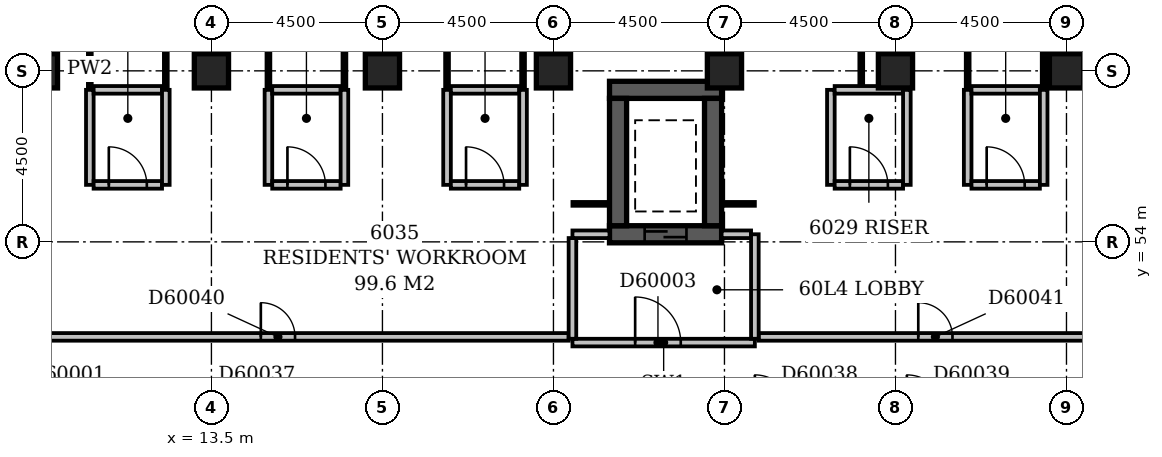
"""IFC4 building model, lengths in metres.
Left out: names, types, materials, properties, quantities, classifications, styles, units other than length and angle.
Written with IfcOpenShell. Run it as: python <this file> out.ifc"""

import sys

from ifc_helpers import new_model, si_unit, direction, frame, frame_2d, origin, origin_2d, place, context, subcontext, project, spatial, rectangle, extrude, element, fill, save


model = new_model("IFC4")
c1 = context("Model", 3, precision=1e-05, world=origin(), true_north=direction((0.0, 1.0)))
c2 = subcontext(c1, "Body", "Model", "MODEL_VIEW")
j1 = project(units=[si_unit("LENGTHUNIT", "METRE"), si_unit("PLANEANGLEUNIT", "RADIAN")], contexts=[c1])
p1 = place(None, origin())
s1 = spatial("IfcSite", under=j1, at=p1, CompositionType="ELEMENT")
p2 = place(p1, origin())
s2 = spatial("IfcBuilding", under=s1, at=p2, CompositionType="ELEMENT")
p3 = place(p2, frame((0.0, 0.0, 233.0)))
s3 = spatial("IfcBuildingStorey", under=s2, at=p3, CompositionType="ELEMENT", Elevation=233.0)
p4 = place(p3, frame((23.975, 54.2, -0.35), z_axis=(0.0, 0.0, 1.0), x_axis=(1.0, 0.0, 0.0)))
e1 = element("IfcWall", 1, at=p4, inside=s3, PredefinedType="SHEAR", context=c2, shape_type="SweptSolid", body=[
    extrude(rectangle(XDim=2.95, YDim=0.45, at=frame_2d((1.475, 0.0))), origin(), (0.0, 0.0, 1.0), 3.65),
])
p5 = place(p4, frame((0.925, 0.0, 0.35)))
e2 = element("IfcOpeningElement", 2, at=p5, cuts=e1, PredefinedType="OPENING", context=c2, shape_type="SweptSolid", body=[
    extrude(rectangle(XDim=1.1, YDim=2.1, at=frame_2d((0.55, 1.05))), frame((0.0, 0.237, 0.0), z_axis=(0.0, -1.0, 0.0), x_axis=(1.0, 0.0, 0.0)), (0.0, 0.0, 1.0), 0.474),
])
p6 = place(p3, frame((23.975, 58.0, -0.35), z_axis=(0.0, 0.0, 1.0), x_axis=(1.0, 0.0, 0.0)))
e3 = element("IfcWall", 3, at=p6, inside=s3, PredefinedType="SHEAR", context=c2, shape_type="SweptSolid", body=[
    extrude(rectangle(XDim=2.95, YDim=0.45, at=frame_2d((1.475, 0.0))), origin(), (0.0, 0.0, 1.0), 3.65),
])
for number, where, z_axis, x_axis in (
    (4, (24.2, 54.425, -0.35), (0.0, 0.0, 1.0), (0.0, 1.0, 0.0)),
    (5, (26.7, 54.425, -0.35), (0.0, 0.0, 1.0), (0.0, 1.0, 0.0)),
):
    element("IfcWall", number, at=place(p3, frame(where, z_axis=z_axis, x_axis=x_axis)), inside=s3, PredefinedType="SHEAR", context=c2, shape_type="SweptSolid", body=[
        extrude(rectangle(XDim=3.35, YDim=0.45, at=frame_2d((1.675, 0.0))), origin(), (0.0, 0.0, 1.0), 3.65),
    ])
for number, where, z_axis, x_axis in (
    (6, (9.0, 58.5, -0.35), (0.0, 0.0, 1.0), (1.0, 0.0, 0.0)),
    (7, (13.5, 58.5, -0.35), (0.0, 0.0, 1.0), (1.0, 0.0, 0.0)),
    (8, (18.0, 58.5, -0.35), (0.0, 0.0, 1.0), (1.0, 0.0, 0.0)),
    (9, (22.5, 58.5, -0.35), (0.0, 0.0, 1.0), (1.0, 0.0, 0.0)),
    (10, (27.0, 58.5, -0.35), (0.0, 0.0, 1.0), (1.0, 0.0, 0.0)),
    (11, (31.5, 58.5, -0.35), (0.0, 0.0, 1.0), (1.0, 0.0, 0.0)),
    (12, (36.0, 58.5, -0.35), (0.0, 0.0, 1.0), (1.0, 0.0, 0.0)),
):
    element("IfcColumn", number, at=place(p3, frame(where, z_axis=z_axis, x_axis=x_axis)), inside=s3, PredefinedType="COLUMN", context=c2, shape_type="SweptSolid", body=[
        extrude(rectangle(XDim=0.9, YDim=0.9, at=origin_2d()), origin(), (0.0, 0.0, 1.0), 3.65),
    ])
p7 = place(p3, frame((23.0, 51.35, 0.0), z_axis=(0.0, 0.0, 1.0), x_axis=(1.0, 0.0, 0.0)))
e13 = element("IfcWall", 13, at=p7, inside=s3, PredefinedType="PARTITIONING", context=c2, shape_type="SweptSolid", body=[
    extrude(rectangle(XDim=4.8, YDim=0.2, at=frame_2d((2.4, 0.0))), origin(), (0.0, 0.0, 1.0), 3.3),
])
p8 = place(p7, frame((1.65, 0.0, 0.0)))
e14 = element("IfcOpeningElement", 14, at=p8, cuts=e13, PredefinedType="OPENING", context=c2, shape_type="SweptSolid", body=[
    extrude(rectangle(XDim=1.2, YDim=2.1, at=frame_2d((0.6, 1.05))), frame((0.0, 0.112, 0.0), z_axis=(0.0, -1.0, 0.0), x_axis=(1.0, 0.0, 0.0)), (0.0, 0.0, 1.0), 0.224),
])
p9 = place(p3, frame((27.8, 51.45, 0.0), z_axis=(0.0, 0.0, 1.0), x_axis=(0.0, 1.0, 0.0)))
e15 = element("IfcWall", 15, at=p9, inside=s3, PredefinedType="PARTITIONING", context=c2, shape_type="SweptSolid", body=[
    extrude(rectangle(XDim=2.75, YDim=0.2, at=frame_2d((1.375, 0.0))), origin(), (0.0, 0.0, 1.0), 3.3),
])
p10 = place(p3, frame((23.0, 54.2, 0.0), z_axis=(0.0, 0.0, 1.0), x_axis=(1.0, 0.0, 0.0)))
e16 = element("IfcWall", 16, at=p10, inside=s3, PredefinedType="PARTITIONING", context=c2, shape_type="SweptSolid", body=[
    extrude(rectangle(XDim=0.975, YDim=0.2, at=frame_2d((0.488, 0.0))), origin(), (0.0, 0.0, 1.0), 3.3),
])
p11 = place(p3, frame((26.925, 54.2, 0.0), z_axis=(0.0, 0.0, 1.0), x_axis=(1.0, 0.0, 0.0)))
e17 = element("IfcWall", 17, at=p11, inside=s3, PredefinedType="PARTITIONING", context=c2, shape_type="SweptSolid", body=[
    extrude(rectangle(XDim=0.775, YDim=0.2, at=frame_2d((0.387, 0.0))), origin(), (0.0, 0.0, 1.0), 3.3),
])
p12 = place(p3, frame((23.0, 51.45, 0.0), z_axis=(0.0, 0.0, 1.0), x_axis=(0.0, 1.0, 0.0)))
e18 = element("IfcWall", 18, at=p12, inside=s3, PredefinedType="PARTITIONING", context=c2, shape_type="SweptSolid", body=[
    extrude(rectangle(XDim=2.65, YDim=0.2, at=frame_2d((1.325, 0.0))), origin(), (0.0, 0.0, 1.0), 3.3),
])
p13 = place(p3, frame((7.6, 51.5, 0.0), z_axis=(0.0, 0.0, 1.0), x_axis=(1.0, 0.0, 0.0)))
e19 = element("IfcWall", 19, at=p13, inside=s3, PredefinedType="PARTITIONING", context=c2, shape_type="SweptSolid", body=[
    extrude(rectangle(XDim=15.3, YDim=0.2, at=frame_2d((7.65, 0.0))), origin(), (0.0, 0.0, 1.0), 3.3),
])
p14 = place(p13, frame((7.2, 0.0, 0.0)))
e20 = element("IfcOpeningElement", 20, at=p14, cuts=e19, PredefinedType="OPENING", context=c2, shape_type="SweptSolid", body=[
    extrude(rectangle(XDim=0.9, YDim=2.1, at=frame_2d((0.45, 1.05))), frame((0.0, 0.112, 0.0), z_axis=(0.0, -1.0, 0.0), x_axis=(1.0, 0.0, 0.0)), (0.0, 0.0, 1.0), 0.224),
])
p15 = place(p3, frame((27.9, 51.5, 0.0), z_axis=(0.0, 0.0, 1.0), x_axis=(1.0, 0.0, 0.0)))
e21 = element("IfcWall", 21, at=p15, inside=s3, PredefinedType="PARTITIONING", context=c2, shape_type="SweptSolid", body=[
    extrude(rectangle(XDim=9.3, YDim=0.2, at=frame_2d((4.65, 0.0))), origin(), (0.0, 0.0, 1.0), 3.3),
])
p16 = place(p15, frame((4.2, 0.0, 0.0)))
e22 = element("IfcOpeningElement", 22, at=p16, cuts=e21, PredefinedType="OPENING", context=c2, shape_type="SweptSolid", body=[
    extrude(rectangle(XDim=0.9, YDim=2.1, at=frame_2d((0.45, 1.05))), frame((0.0, 0.112, 0.0), z_axis=(0.0, -1.0, 0.0), x_axis=(1.0, 0.0, 0.0)), (0.0, 0.0, 1.0), 0.224),
])
p17 = place(p3, frame((23.0, 55.0, 0.0), z_axis=(0.0, 0.0, 1.0), x_axis=(1.0, 0.0, 0.0)))
e23 = element("IfcWall", 23, at=p17, inside=s3, PredefinedType="PARTITIONING", context=c2, shape_type="SweptSolid", body=[
    extrude(rectangle(XDim=0.975, YDim=0.1, at=frame_2d((0.488, 0.0))), origin(), (0.0, 0.0, 1.0), 3.3),
])
p18 = place(p3, frame((26.925, 55.0, 0.0), z_axis=(0.0, 0.0, 1.0), x_axis=(1.0, 0.0, 0.0)))
e24 = element("IfcWall", 24, at=p18, inside=s3, PredefinedType="PARTITIONING", context=c2, shape_type="SweptSolid", body=[
    extrude(rectangle(XDim=0.875, YDim=0.1, at=frame_2d((0.438, 0.0))), origin(), (0.0, 0.0, 1.0), 3.3),
])
p19 = place(p3, frame((10.3, 55.5, 0.0), z_axis=(0.0, 0.0, 1.0), x_axis=(0.0, 1.0, 0.0)))
e25 = element("IfcWall", 25, at=p19, inside=s3, PredefinedType="PARTITIONING", context=c2, shape_type="SweptSolid", body=[
    extrude(rectangle(XDim=2.5, YDim=0.2, at=frame_2d((1.25, 0.0))), origin(), (0.0, 0.0, 1.0), 3.3),
])
p20 = place(p3, frame((10.4, 55.5, 0.0), z_axis=(0.0, 0.0, 1.0), x_axis=(1.0, 0.0, 0.0)))
e26 = element("IfcWall", 26, at=p20, inside=s3, PredefinedType="PARTITIONING", context=c2, shape_type="SweptSolid", body=[
    extrude(rectangle(XDim=1.8, YDim=0.2, at=frame_2d((0.9, 0.0))), origin(), (0.0, 0.0, 1.0), 3.3),
])
p21 = place(p20, frame((0.4, 0.0, 0.0)))
e27 = element("IfcOpeningElement", 27, at=p21, cuts=e26, PredefinedType="OPENING", context=c2, shape_type="SweptSolid", body=[
    extrude(rectangle(XDim=1.0, YDim=2.1, at=frame_2d((0.5, 1.05))), frame((0.0, 0.112, 0.0), z_axis=(0.0, -1.0, 0.0), x_axis=(1.0, 0.0, 0.0)), (0.0, 0.0, 1.0), 0.224),
])
for number, where, z_axis, x_axis in (
    (28, (12.3, 55.5, 0.0), (0.0, 0.0, 1.0), (0.0, 1.0, 0.0)),
    (29, (15.0, 55.5, 0.0), (0.0, 0.0, 1.0), (0.0, 1.0, 0.0)),
):
    element("IfcWall", number, at=place(p3, frame(where, z_axis=z_axis, x_axis=x_axis)), inside=s3, PredefinedType="PARTITIONING", context=c2, shape_type="SweptSolid", body=[
        extrude(rectangle(XDim=2.5, YDim=0.2, at=frame_2d((1.25, 0.0))), origin(), (0.0, 0.0, 1.0), 3.3),
    ])
p22 = place(p3, frame((15.1, 55.5, 0.0), z_axis=(0.0, 0.0, 1.0), x_axis=(1.0, 0.0, 0.0)))
e30 = element("IfcWall", 30, at=p22, inside=s3, PredefinedType="PARTITIONING", context=c2, shape_type="SweptSolid", body=[
    extrude(rectangle(XDim=1.8, YDim=0.2, at=frame_2d((0.9, 0.0))), origin(), (0.0, 0.0, 1.0), 3.3),
])
p23 = place(p22, frame((0.4, 0.0, 0.0)))
e31 = element("IfcOpeningElement", 31, at=p23, cuts=e30, PredefinedType="OPENING", context=c2, shape_type="SweptSolid", body=[
    extrude(rectangle(XDim=1.0, YDim=2.1, at=frame_2d((0.5, 1.05))), frame((0.0, 0.112, 0.0), z_axis=(0.0, -1.0, 0.0), x_axis=(1.0, 0.0, 0.0)), (0.0, 0.0, 1.0), 0.224),
])
for number, where, z_axis, x_axis in (
    (32, (17.0, 55.5, 0.0), (0.0, 0.0, 1.0), (0.0, 1.0, 0.0)),
    (33, (19.7, 55.5, 0.0), (0.0, 0.0, 1.0), (0.0, 1.0, 0.0)),
):
    element("IfcWall", number, at=place(p3, frame(where, z_axis=z_axis, x_axis=x_axis)), inside=s3, PredefinedType="PARTITIONING", context=c2, shape_type="SweptSolid", body=[
        extrude(rectangle(XDim=2.5, YDim=0.2, at=frame_2d((1.25, 0.0))), origin(), (0.0, 0.0, 1.0), 3.3),
    ])
p24 = place(p3, frame((19.8, 55.5, 0.0), z_axis=(0.0, 0.0, 1.0), x_axis=(1.0, 0.0, 0.0)))
e34 = element("IfcWall", 34, at=p24, inside=s3, PredefinedType="PARTITIONING", context=c2, shape_type="SweptSolid", body=[
    extrude(rectangle(XDim=1.8, YDim=0.2, at=frame_2d((0.9, 0.0))), origin(), (0.0, 0.0, 1.0), 3.3),
])
p25 = place(p24, frame((0.4, 0.0, 0.0)))
e35 = element("IfcOpeningElement", 35, at=p25, cuts=e34, PredefinedType="OPENING", context=c2, shape_type="SweptSolid", body=[
    extrude(rectangle(XDim=1.0, YDim=2.1, at=frame_2d((0.5, 1.05))), frame((0.0, 0.112, 0.0), z_axis=(0.0, -1.0, 0.0), x_axis=(1.0, 0.0, 0.0)), (0.0, 0.0, 1.0), 0.224),
])
for number, where, z_axis, x_axis in (
    (36, (21.7, 55.5, 0.0), (0.0, 0.0, 1.0), (0.0, 1.0, 0.0)),
    (37, (29.8, 55.5, 0.0), (0.0, 0.0, 1.0), (0.0, 1.0, 0.0)),
):
    element("IfcWall", number, at=place(p3, frame(where, z_axis=z_axis, x_axis=x_axis)), inside=s3, PredefinedType="PARTITIONING", context=c2, shape_type="SweptSolid", body=[
        extrude(rectangle(XDim=2.5, YDim=0.2, at=frame_2d((1.25, 0.0))), origin(), (0.0, 0.0, 1.0), 3.3),
    ])
p26 = place(p3, frame((29.9, 55.5, 0.0), z_axis=(0.0, 0.0, 1.0), x_axis=(1.0, 0.0, 0.0)))
e38 = element("IfcWall", 38, at=p26, inside=s3, PredefinedType="PARTITIONING", context=c2, shape_type="SweptSolid", body=[
    extrude(rectangle(XDim=1.8, YDim=0.2, at=frame_2d((0.9, 0.0))), origin(), (0.0, 0.0, 1.0), 3.3),
])
p27 = place(p26, frame((0.4, 0.0, 0.0)))
e39 = element("IfcOpeningElement", 39, at=p27, cuts=e38, PredefinedType="OPENING", context=c2, shape_type="SweptSolid", body=[
    extrude(rectangle(XDim=1.0, YDim=2.1, at=frame_2d((0.5, 1.05))), frame((0.0, 0.112, 0.0), z_axis=(0.0, -1.0, 0.0), x_axis=(1.0, 0.0, 0.0)), (0.0, 0.0, 1.0), 0.224),
])
for number, where, z_axis, x_axis in (
    (40, (31.8, 55.5, 0.0), (0.0, 0.0, 1.0), (0.0, 1.0, 0.0)),
    (41, (33.4, 55.5, 0.0), (0.0, 0.0, 1.0), (0.0, 1.0, 0.0)),
):
    element("IfcWall", number, at=place(p3, frame(where, z_axis=z_axis, x_axis=x_axis)), inside=s3, PredefinedType="PARTITIONING", context=c2, shape_type="SweptSolid", body=[
        extrude(rectangle(XDim=2.5, YDim=0.2, at=frame_2d((1.25, 0.0))), origin(), (0.0, 0.0, 1.0), 3.3),
    ])
p28 = place(p3, frame((33.5, 55.5, 0.0), z_axis=(0.0, 0.0, 1.0), x_axis=(1.0, 0.0, 0.0)))
e42 = element("IfcWall", 42, at=p28, inside=s3, PredefinedType="PARTITIONING", context=c2, shape_type="SweptSolid", body=[
    extrude(rectangle(XDim=1.8, YDim=0.2, at=frame_2d((0.9, 0.0))), origin(), (0.0, 0.0, 1.0), 3.3),
])
p29 = place(p28, frame((0.4, 0.0, 0.0)))
e43 = element("IfcOpeningElement", 43, at=p29, cuts=e42, PredefinedType="OPENING", context=c2, shape_type="SweptSolid", body=[
    extrude(rectangle(XDim=1.0, YDim=2.1, at=frame_2d((0.5, 1.05))), frame((0.0, 0.112, 0.0), z_axis=(0.0, -1.0, 0.0), x_axis=(1.0, 0.0, 0.0)), (0.0, 0.0, 1.0), 0.224),
])
p30 = place(p3, frame((35.4, 55.5, 0.0), z_axis=(0.0, 0.0, 1.0), x_axis=(0.0, 1.0, 0.0)))
e44 = element("IfcWall", 44, at=p30, inside=s3, PredefinedType="PARTITIONING", context=c2, shape_type="SweptSolid", body=[
    extrude(rectangle(XDim=2.5, YDim=0.2, at=frame_2d((1.25, 0.0))), origin(), (0.0, 0.0, 1.0), 2.4),
])
p31 = place(p3, frame((10.3, 58.0, 0.0), z_axis=(0.0, 0.0, 1.0), x_axis=(0.0, 1.0, 0.0)))
e45 = element("IfcWall", 45, at=p31, inside=s3, PredefinedType="PARTITIONING", context=c2, shape_type="SweptSolid", body=[
    extrude(rectangle(XDim=1.1, YDim=0.1, at=frame_2d((0.55, 0.0))), origin(), (0.0, 0.0, 1.0), 3.3),
])
p32 = place(p3, frame((10.4, 58.0, 0.0), z_axis=(0.0, 0.0, 1.0), x_axis=(1.0, 0.0, 0.0)))
e46 = element("IfcWall", 46, at=p32, inside=s3, PredefinedType="PARTITIONING", context=c2, shape_type="SweptSolid", body=[
    extrude(rectangle(XDim=1.8, YDim=0.2, at=frame_2d((0.9, 0.0))), origin(), (0.0, 0.0, 1.0), 3.3),
])
for number, where, z_axis, x_axis in (
    (47, (12.3, 58.0, 0.0), (0.0, 0.0, 1.0), (0.0, 1.0, 0.0)),
    (48, (15.0, 58.0, 0.0), (0.0, 0.0, 1.0), (0.0, 1.0, 0.0)),
):
    element("IfcWall", number, at=place(p3, frame(where, z_axis=z_axis, x_axis=x_axis)), inside=s3, PredefinedType="PARTITIONING", context=c2, shape_type="SweptSolid", body=[
        extrude(rectangle(XDim=1.1, YDim=0.1, at=frame_2d((0.55, 0.0))), origin(), (0.0, 0.0, 1.0), 3.3),
    ])
p33 = place(p3, frame((15.1, 58.0, 0.0), z_axis=(0.0, 0.0, 1.0), x_axis=(1.0, 0.0, 0.0)))
e49 = element("IfcWall", 49, at=p33, inside=s3, PredefinedType="PARTITIONING", context=c2, shape_type="SweptSolid", body=[
    extrude(rectangle(XDim=1.8, YDim=0.2, at=frame_2d((0.9, 0.0))), origin(), (0.0, 0.0, 1.0), 3.3),
])
for number, where, z_axis, x_axis in (
    (50, (17.0, 58.0, 0.0), (0.0, 0.0, 1.0), (0.0, 1.0, 0.0)),
    (51, (19.7, 58.0, 0.0), (0.0, 0.0, 1.0), (0.0, 1.0, 0.0)),
):
    element("IfcWall", number, at=place(p3, frame(where, z_axis=z_axis, x_axis=x_axis)), inside=s3, PredefinedType="PARTITIONING", context=c2, shape_type="SweptSolid", body=[
        extrude(rectangle(XDim=1.1, YDim=0.1, at=frame_2d((0.55, 0.0))), origin(), (0.0, 0.0, 1.0), 3.3),
    ])
p34 = place(p3, frame((19.8, 58.0, 0.0), z_axis=(0.0, 0.0, 1.0), x_axis=(1.0, 0.0, 0.0)))
e52 = element("IfcWall", 52, at=p34, inside=s3, PredefinedType="PARTITIONING", context=c2, shape_type="SweptSolid", body=[
    extrude(rectangle(XDim=1.8, YDim=0.2, at=frame_2d((0.9, 0.0))), origin(), (0.0, 0.0, 1.0), 3.3),
])
p35 = place(p3, frame((21.7, 58.0, 0.0), z_axis=(0.0, 0.0, 1.0), x_axis=(0.0, 1.0, 0.0)))
e53 = element("IfcWall", 53, at=p35, inside=s3, PredefinedType="PARTITIONING", context=c2, shape_type="SweptSolid", body=[
    extrude(rectangle(XDim=1.1, YDim=0.1, at=frame_2d((0.55, 0.0))), origin(), (0.0, 0.0, 1.0), 3.3),
])
p36 = place(p3, frame((29.9, 58.0, 0.0), z_axis=(0.0, 0.0, 1.0), x_axis=(1.0, 0.0, 0.0)))
e54 = element("IfcWall", 54, at=p36, inside=s3, PredefinedType="PARTITIONING", context=c2, shape_type="SweptSolid", body=[
    extrude(rectangle(XDim=1.8, YDim=0.2, at=frame_2d((0.9, 0.0))), origin(), (0.0, 0.0, 1.0), 3.3),
])
p37 = place(p3, frame((33.4, 58.0, 0.0), z_axis=(0.0, 0.0, 1.0), x_axis=(0.0, 1.0, 0.0)))
e55 = element("IfcWall", 55, at=p37, inside=s3, PredefinedType="PARTITIONING", context=c2, shape_type="SweptSolid", body=[
    extrude(rectangle(XDim=1.1, YDim=0.1, at=frame_2d((0.55, 0.0))), origin(), (0.0, 0.0, 1.0), 3.3),
])
p38 = place(p3, frame((33.5, 58.0, 0.0), z_axis=(0.0, 0.0, 1.0), x_axis=(1.0, 0.0, 0.0)))
e56 = element("IfcWall", 56, at=p38, inside=s3, PredefinedType="PARTITIONING", context=c2, shape_type="SweptSolid", body=[
    extrude(rectangle(XDim=1.8, YDim=0.2, at=frame_2d((0.9, 0.0))), origin(), (0.0, 0.0, 1.0), 3.3),
])
p39 = place(p3, frame((35.4, 58.0, 0.0), z_axis=(0.0, 0.0, 1.0), x_axis=(0.0, 1.0, 0.0)))
e57 = element("IfcWall", 57, at=p39, inside=s3, PredefinedType="PARTITIONING", context=c2, shape_type="SweptSolid", body=[
    extrude(rectangle(XDim=1.1, YDim=0.1, at=frame_2d((0.55, 0.0))), origin(), (0.0, 0.0, 1.0), 2.4),
])
p40 = place(p3, frame((30.6, 58.1, 0.0), z_axis=(0.0, 0.0, 1.0), x_axis=(0.0, 1.0, 0.0)))
e58 = element("IfcWall", 58, at=p40, inside=s3, PredefinedType="PARTITIONING", context=c2, shape_type="SweptSolid", body=[
    extrude(rectangle(XDim=1.0, YDim=0.1, at=frame_2d((0.5, 0.0))), origin(), (0.0, 0.0, 1.0), 3.3),
])
p41 = place(p8, origin())
e59 = element("IfcDoor", 59, at=p41, inside=s3, OperationType="SINGLE_SWING_LEFT", PredefinedType="DOOR", context=c2, shape_type="SweptSolid", body=[
    extrude(rectangle(XDim=1.2, YDim=2.1, at=frame_2d((0.6, 1.05))), frame((0.0, 0.025, 0.0), z_axis=(0.0, -1.0, 0.0), x_axis=(1.0, 0.0, 0.0)), (0.0, 0.0, 1.0), 0.05),
])
fill(e14, e59)
p42 = place(p5, origin())
e60 = element("IfcDoor", 60, at=p42, inside=s3, OperationType="SLIDING_TO_LEFT", PredefinedType="DOOR", context=c2, shape_type="SweptSolid", body=[
    extrude(rectangle(XDim=1.1, YDim=2.1, at=frame_2d((0.55, 1.05))), frame((0.0, 0.025, 0.0), z_axis=(0.0, -1.0, 0.0), x_axis=(1.0, 0.0, 0.0)), (0.0, 0.0, 1.0), 0.05),
])
fill(e2, e60)
p43 = place(p14, origin())
e61 = element("IfcDoor", 61, at=p43, inside=s3, OperationType="SINGLE_SWING_LEFT", PredefinedType="DOOR", context=c2, shape_type="SweptSolid", body=[
    extrude(rectangle(XDim=0.9, YDim=2.1, at=frame_2d((0.45, 1.05))), frame((0.0, 0.025, 0.0), z_axis=(0.0, -1.0, 0.0), x_axis=(1.0, 0.0, 0.0)), (0.0, 0.0, 1.0), 0.05),
])
fill(e20, e61)
p44 = place(p16, origin())
e62 = element("IfcDoor", 62, at=p44, inside=s3, OperationType="SINGLE_SWING_LEFT", PredefinedType="DOOR", context=c2, shape_type="SweptSolid", body=[
    extrude(rectangle(XDim=0.9, YDim=2.1, at=frame_2d((0.45, 1.05))), frame((0.0, 0.025, 0.0), z_axis=(0.0, -1.0, 0.0), x_axis=(1.0, 0.0, 0.0)), (0.0, 0.0, 1.0), 0.05),
])
fill(e22, e62)
p45 = place(p21, origin())
e63 = element("IfcDoor", 63, at=p45, inside=s3, OperationType="SINGLE_SWING_LEFT", PredefinedType="DOOR", context=c2, shape_type="SweptSolid", body=[
    extrude(rectangle(XDim=1.0, YDim=2.1, at=frame_2d((0.5, 1.05))), frame((0.0, 0.025, 0.0), z_axis=(0.0, -1.0, 0.0), x_axis=(1.0, 0.0, 0.0)), (0.0, 0.0, 1.0), 0.05),
])
fill(e27, e63)
p46 = place(p23, origin())
e64 = element("IfcDoor", 64, at=p46, inside=s3, OperationType="SINGLE_SWING_LEFT", PredefinedType="DOOR", context=c2, shape_type="SweptSolid", body=[
    extrude(rectangle(XDim=1.0, YDim=2.1, at=frame_2d((0.5, 1.05))), frame((0.0, 0.025, 0.0), z_axis=(0.0, -1.0, 0.0), x_axis=(1.0, 0.0, 0.0)), (0.0, 0.0, 1.0), 0.05),
])
fill(e31, e64)
p47 = place(p25, origin())
e65 = element("IfcDoor", 65, at=p47, inside=s3, OperationType="SINGLE_SWING_LEFT", PredefinedType="DOOR", context=c2, shape_type="SweptSolid", body=[
    extrude(rectangle(XDim=1.0, YDim=2.1, at=frame_2d((0.5, 1.05))), frame((0.0, 0.025, 0.0), z_axis=(0.0, -1.0, 0.0), x_axis=(1.0, 0.0, 0.0)), (0.0, 0.0, 1.0), 0.05),
])
fill(e35, e65)
p48 = place(p27, origin())
e66 = element("IfcDoor", 66, at=p48, inside=s3, OperationType="SINGLE_SWING_LEFT", PredefinedType="DOOR", context=c2, shape_type="SweptSolid", body=[
    extrude(rectangle(XDim=1.0, YDim=2.1, at=frame_2d((0.5, 1.05))), frame((0.0, 0.025, 0.0), z_axis=(0.0, -1.0, 0.0), x_axis=(1.0, 0.0, 0.0)), (0.0, 0.0, 1.0), 0.05),
])
fill(e39, e66)
p49 = place(p29, origin())
e67 = element("IfcDoor", 67, at=p49, inside=s3, OperationType="SINGLE_SWING_LEFT", PredefinedType="DOOR", context=c2, shape_type="SweptSolid", body=[
    extrude(rectangle(XDim=1.0, YDim=2.1, at=frame_2d((0.5, 1.05))), frame((0.0, 0.025, 0.0), z_axis=(0.0, -1.0, 0.0), x_axis=(1.0, 0.0, 0.0)), (0.0, 0.0, 1.0), 0.05),
])
fill(e43, e67)
save(model, sys.argv[1])
